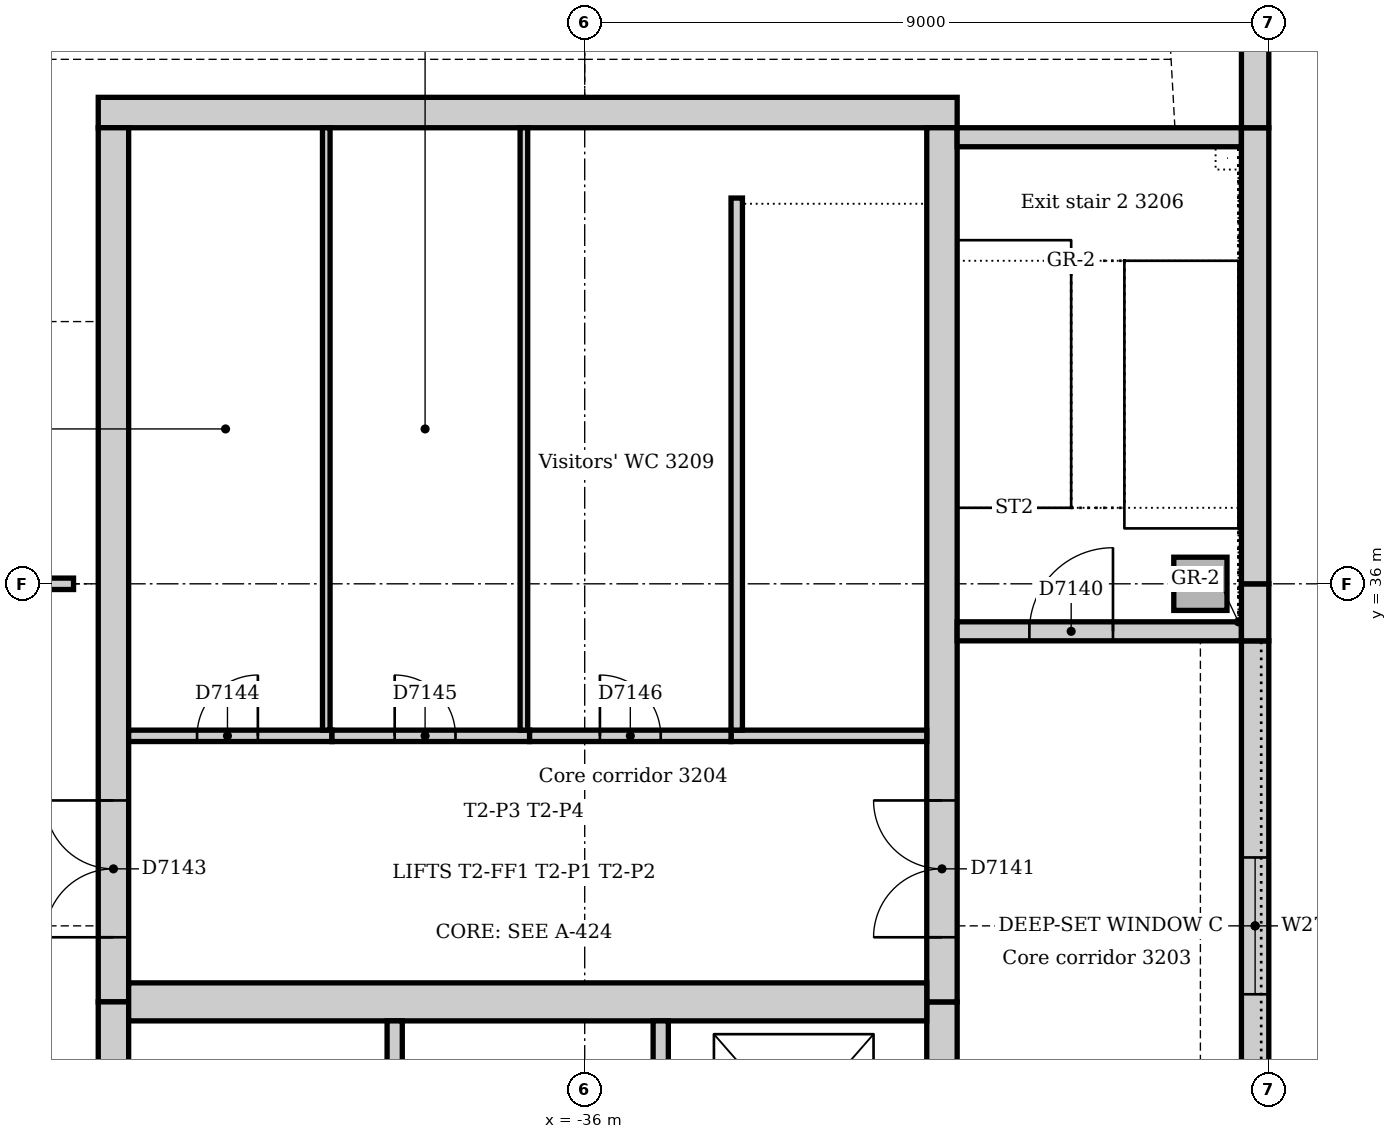
"""IFC4 building model, lengths in metres.
Left out: names, types, materials, properties, quantities, classifications, styles, units other than length and angle.
Written with IfcOpenShell. Run it as: python <this file> out.ifc"""

import sys

from ifc_helpers import new_model, si_unit, direction, frame, frame_2d, origin, origin_2d, place, context, subcontext, project, spatial, rectangle, extrude, element, fill, save


model = new_model("IFC4")
c1 = context("Model", 3, precision=1e-05, world=origin(), true_north=direction((0.0, 1.0)))
c2 = subcontext(c1, "Body", "Model", "MODEL_VIEW")
j1 = project(units=[si_unit("LENGTHUNIT", "METRE"), si_unit("PLANEANGLEUNIT", "RADIAN")], contexts=[c1])
p1 = place(None, origin())
s1 = spatial("IfcSite", under=j1, at=p1, CompositionType="ELEMENT")
p2 = place(p1, origin())
s2 = spatial("IfcBuilding", under=s1, at=p2, CompositionType="ELEMENT")
p3 = place(p2, frame((0.0, 0.0, 136.0)))
s3 = spatial("IfcBuildingStorey", under=s2, at=p3, CompositionType="ELEMENT", Elevation=136.0)
p4 = place(p3, frame((-31.1, 42.2, 0.0), z_axis=(0.0, 0.0, 1.0), x_axis=(-1.0, 0.0, 0.0)))
e1 = element("IfcWall", 1, at=p4, inside=s3, PredefinedType="SOLIDWALL", context=c2, shape_type="SweptSolid", body=[
    extrude(rectangle(XDim=11.3, YDim=0.4, at=frame_2d((5.65, 0.0))), origin(), (0.0, 0.0, 1.0), 4.0),
])
p5 = place(p3, frame((-31.3, 21.0, 0.0), z_axis=(0.0, 0.0, 1.0), x_axis=(0.0, 1.0, 0.0)))
e2 = element("IfcWall", 2, at=p5, inside=s3, PredefinedType="SOLIDWALL", context=c2, shape_type="SweptSolid", body=[
    extrude(rectangle(XDim=9.5, YDim=0.4, at=frame_2d((4.75, 0.0))), origin(), (0.0, 0.0, 1.0), 4.0),
])
p6 = place(p5, frame((5.25, 0.0, 0.0)))
e3 = element("IfcOpeningElement", 3, at=p6, cuts=e2, PredefinedType="OPENING", context=c2, shape_type="SweptSolid", body=[
    extrude(rectangle(XDim=1.0, YDim=2.1, at=frame_2d((0.5, 1.05))), frame((0.0, 0.21, 0.0), z_axis=(0.0, -1.0, 0.0), x_axis=(1.0, 0.0, 0.0)), (0.0, 0.0, 1.0), 0.42),
])
p7 = place(p3, frame((-31.3, 30.5, 0.0), z_axis=(0.0, 0.0, 1.0), x_axis=(0.0, 1.0, 0.0)))
e4 = element("IfcWall", 4, at=p7, inside=s3, PredefinedType="SOLIDWALL", context=c2, shape_type="SweptSolid", body=[
    extrude(rectangle(XDim=11.5, YDim=0.4, at=frame_2d((5.75, 0.0))), origin(), (0.0, 0.0, 1.0), 4.0),
])
p8 = place(p7, frame((0.85, 0.0, 0.0)))
e5 = element("IfcOpeningElement", 5, at=p8, cuts=e4, PredefinedType="OPENING", context=c2, shape_type="SweptSolid", body=[
    extrude(rectangle(XDim=1.8, YDim=2.1, at=frame_2d((0.9, 1.05))), frame((0.0, 0.21, 0.0), z_axis=(0.0, -1.0, 0.0), x_axis=(1.0, 0.0, 0.0)), (0.0, 0.0, 1.0), 0.42),
])
p9 = place(p3, frame((-42.2, 42.0, 0.0), z_axis=(0.0, 0.0, 1.0), x_axis=(0.0, -1.0, 0.0)))
e6 = element("IfcWall", 6, at=p9, inside=s3, PredefinedType="SOLIDWALL", context=c2, shape_type="SweptSolid", body=[
    extrude(rectangle(XDim=11.5, YDim=0.4, at=frame_2d((5.75, 0.0))), origin(), (0.0, 0.0, 1.0), 4.0),
])
p10 = place(p9, frame((8.85, 0.0, 0.0)))
e7 = element("IfcOpeningElement", 7, at=p10, cuts=e6, PredefinedType="OPENING", context=c2, shape_type="SweptSolid", body=[
    extrude(rectangle(XDim=1.8, YDim=2.1, at=frame_2d((0.9, 1.05))), frame((0.0, 0.21, 0.0), z_axis=(0.0, -1.0, 0.0), x_axis=(1.0, 0.0, 0.0)), (0.0, 0.0, 1.0), 0.42),
])
p11 = place(p3, frame((-42.2, 30.5, 0.0), z_axis=(0.0, 0.0, 1.0), x_axis=(0.0, -1.0, 0.0)))
e8 = element("IfcWall", 8, at=p11, inside=s3, PredefinedType="SOLIDWALL", context=c2, shape_type="SweptSolid", body=[
    extrude(rectangle(XDim=9.5, YDim=0.4, at=frame_2d((4.75, 0.0))), origin(), (0.0, 0.0, 1.0), 4.0),
])
p12 = place(p11, frame((3.85, 0.0, 0.0)))
e9 = element("IfcOpeningElement", 9, at=p12, cuts=e8, PredefinedType="OPENING", context=c2, shape_type="SweptSolid", body=[
    extrude(rectangle(XDim=1.8, YDim=2.1, at=frame_2d((0.9, 1.05))), frame((0.0, 0.21, 0.0), z_axis=(0.0, -1.0, 0.0), x_axis=(1.0, 0.0, 0.0)), (0.0, 0.0, 1.0), 0.42),
])
p13 = place(p3, frame((-42.0, 30.5, 0.0), z_axis=(0.0, 0.0, 1.0), x_axis=(1.0, 0.0, 0.0)))
e10 = element("IfcWall", 10, at=p13, inside=s3, PredefinedType="SOLIDWALL", context=c2, shape_type="SweptSolid", body=[
    extrude(rectangle(XDim=10.5, YDim=0.5, at=frame_2d((5.25, 0.0))), origin(), (0.0, 0.0, 1.0), 4.0),
])
p14 = place(p3, frame((-31.1, 35.375, 0.0), z_axis=(0.0, 0.0, 1.0), x_axis=(1.0, 0.0, 0.0)))
e11 = element("IfcWall", 11, at=p14, inside=s3, PredefinedType="SOLIDWALL", context=c2, shape_type="SweptSolid", body=[
    extrude(rectangle(XDim=3.74, YDim=0.25, at=frame_2d((1.87, 0.0))), origin(), (0.0, 0.0, 1.0), 4.0),
])
p15 = place(p14, frame((0.95, 0.0, 0.0)))
e12 = element("IfcOpeningElement", 12, at=p15, cuts=e11, PredefinedType="OPENING", context=c2, shape_type="SweptSolid", body=[
    extrude(rectangle(XDim=1.1, YDim=2.1, at=frame_2d((0.55, 1.05))), frame((0.0, 0.135, 0.0), z_axis=(0.0, -1.0, 0.0), x_axis=(1.0, 0.0, 0.0)), (0.0, 0.0, 1.0), 0.27),
])
p16 = place(p3, frame((-27.36, 41.875, 0.0), z_axis=(0.0, 0.0, 1.0), x_axis=(-1.0, 0.0, 0.0)))
e13 = element("IfcWall", 13, at=p16, inside=s3, PredefinedType="SOLIDWALL", context=c2, shape_type="SweptSolid", body=[
    extrude(rectangle(XDim=3.74, YDim=0.25, at=frame_2d((1.87, 0.0))), origin(), (0.0, 0.0, 1.0), 4.0),
])
p17 = place(p3, frame((-27.9, 36.0, 0.0), z_axis=(0.0, 0.0, 1.0), x_axis=(1.0, 0.0, 0.0)))
e14 = element("IfcColumn", 14, at=p17, inside=s3, PredefinedType="COLUMN", context=c2, shape_type="SweptSolid", body=[
    extrude(rectangle(XDim=0.7, YDim=0.7, at=origin_2d()), origin(), (0.0, 0.0, 1.0), 4.0),
])
p18 = place(p3, frame((-27.18, 27.75, 0.0), z_axis=(0.0, 0.0, 1.0), x_axis=(0.0, 1.0, 0.0)))
e15 = element("IfcWall", 15, at=p18, inside=s3, PredefinedType="STANDARD", context=c2, shape_type="SweptSolid", body=[
    extrude(rectangle(XDim=7.5, YDim=0.36, at=frame_2d((3.75, 0.0))), origin(), (0.0, 0.0, 1.0), 3.436),
])
p19 = place(p18, frame((2.85, 0.0, 1.2)))
e16 = element("IfcOpeningElement", 16, at=p19, cuts=e15, PredefinedType="OPENING", context=c2, shape_type="SweptSolid", body=[
    extrude(rectangle(XDim=1.8, YDim=1.2, at=frame_2d((0.9, 0.6))), frame((0.0, 0.19, 0.0), z_axis=(0.0, -1.0, 0.0), x_axis=(1.0, 0.0, 0.0)), (0.0, 0.0, 1.0), 0.38),
])
p20 = place(p3, frame((-27.18, 35.25, 0.0), z_axis=(0.0, 0.0, 1.0), x_axis=(0.0, 1.0, 0.0)))
e17 = element("IfcWall", 17, at=p20, inside=s3, PredefinedType="STANDARD", context=c2, shape_type="SweptSolid", body=[
    extrude(rectangle(XDim=0.75, YDim=0.36, at=frame_2d((0.375, 0.0))), origin(), (0.0, 0.0, 1.0), 3.436),
])
p21 = place(p3, frame((-27.18, 36.0, 0.0), z_axis=(0.0, 0.0, 1.0), x_axis=(0.0, 1.0, 0.0)))
e18 = element("IfcWall", 18, at=p21, inside=s3, PredefinedType="STANDARD", context=c2, shape_type="SweptSolid", body=[
    extrude(rectangle(XDim=6.0, YDim=0.36, at=frame_2d((3.0, 0.0))), origin(), (0.0, 0.0, 1.0), 3.85),
])
p22 = place(p3, frame((-27.18, 42.0, 0.0), z_axis=(0.0, 0.0, 1.0), x_axis=(0.0, 1.0, 0.0)))
e19 = element("IfcWall", 19, at=p22, inside=s3, PredefinedType="STANDARD", context=c2, shape_type="SweptSolid", body=[
    extrude(rectangle(XDim=3.257, YDim=0.36, at=frame_2d((1.629, 0.0))), origin(), (0.0, 0.0, 1.0), 3.85),
])
for number, where, z_axis, x_axis in (
    (20, (-38.5, 27.4, 0.0), (0.0, 0.0, 1.0), (0.0, 1.0, 0.0)),
    (21, (-35.0, 27.4, 0.0), (0.0, 0.0, 1.0), (0.0, 1.0, 0.0)),
):
    element("IfcWall", number, at=place(p3, frame(where, z_axis=z_axis, x_axis=x_axis)), inside=s3, PredefinedType="SOLIDWALL", context=c2, shape_type="SweptSolid", body=[
        extrude(rectangle(XDim=2.85, YDim=0.2, at=frame_2d((1.425, 0.0))), origin(), (0.0, 0.0, 1.0), 4.0),
    ])
p23 = place(p3, frame((-34.075, 34.0, 0.0), z_axis=(0.0, 0.0, 1.0), x_axis=(1.0, 0.0, 0.0)))
e22 = element("IfcWall", 22, at=p23, inside=s3, PredefinedType="SOLIDWALL", context=c2, shape_type="SweptSolid", body=[
    extrude(rectangle(XDim=2.575, YDim=0.15, at=frame_2d((1.288, 0.0))), origin(), (0.0, 0.0, 1.0), 4.0),
])
p24 = place(p3, frame((-34.0, 41.075, 0.0), z_axis=(0.0, 0.0, 1.0), x_axis=(0.0, -1.0, 0.0)))
e23 = element("IfcWall", 23, at=p24, inside=s3, PredefinedType="SOLIDWALL", context=c2, shape_type="SweptSolid", body=[
    extrude(rectangle(XDim=7.0, YDim=0.15, at=frame_2d((3.5, 0.0))), origin(), (0.0, 0.0, 1.0), 4.0),
])
p25 = place(p3, frame((-39.325, 34.0, 0.0), z_axis=(0.0, 0.0, 1.0), x_axis=(-1.0, 0.0, 0.0)))
e24 = element("IfcWall", 24, at=p25, inside=s3, PredefinedType="PARTITIONING", context=c2, shape_type="SweptSolid", body=[
    extrude(rectangle(XDim=2.675, YDim=0.15, at=frame_2d((1.337, 0.0))), origin(), (0.0, 0.0, 1.0), 3.85),
])
p26 = place(p25, frame((0.975, 0.0, 0.0)))
e25 = element("IfcOpeningElement", 25, at=p26, cuts=e24, PredefinedType="OPENING", context=c2, shape_type="SweptSolid", body=[
    extrude(rectangle(XDim=0.8, YDim=2.1, at=frame_2d((0.4, 1.05))), frame((0.0, 0.085, 0.0), z_axis=(0.0, -1.0, 0.0), x_axis=(1.0, 0.0, 0.0)), (0.0, 0.0, 1.0), 0.17),
])
p27 = place(p3, frame((-36.725, 34.0, 0.0), z_axis=(0.0, 0.0, 1.0), x_axis=(-1.0, 0.0, 0.0)))
e26 = element("IfcWall", 26, at=p27, inside=s3, PredefinedType="PARTITIONING", context=c2, shape_type="SweptSolid", body=[
    extrude(rectangle(XDim=2.6, YDim=0.15, at=frame_2d((1.3, 0.0))), origin(), (0.0, 0.0, 1.0), 3.85),
])
p28 = place(p27, frame((0.975, 0.0, 0.0)))
e27 = element("IfcOpeningElement", 27, at=p28, cuts=e26, PredefinedType="OPENING", context=c2, shape_type="SweptSolid", body=[
    extrude(rectangle(XDim=0.8, YDim=2.1, at=frame_2d((0.4, 1.05))), frame((0.0, 0.085, 0.0), z_axis=(0.0, -1.0, 0.0), x_axis=(1.0, 0.0, 0.0)), (0.0, 0.0, 1.0), 0.17),
])
p29 = place(p3, frame((-34.075, 34.0, 0.0), z_axis=(0.0, 0.0, 1.0), x_axis=(-1.0, 0.0, 0.0)))
e28 = element("IfcWall", 28, at=p29, inside=s3, PredefinedType="PARTITIONING", context=c2, shape_type="SweptSolid", body=[
    extrude(rectangle(XDim=2.65, YDim=0.15, at=frame_2d((1.325, 0.0))), origin(), (0.0, 0.0, 1.0), 3.85),
])
p30 = place(p29, frame((0.925, 0.0, 0.0)))
e29 = element("IfcOpeningElement", 29, at=p30, cuts=e28, PredefinedType="OPENING", context=c2, shape_type="SweptSolid", body=[
    extrude(rectangle(XDim=0.8, YDim=2.1, at=frame_2d((0.4, 1.05))), frame((0.0, 0.085, 0.0), z_axis=(0.0, -1.0, 0.0), x_axis=(1.0, 0.0, 0.0)), (0.0, 0.0, 1.0), 0.17),
])
for number, where, z_axis, x_axis in (
    (30, (-39.4, 34.075, 0.0), (0.0, 0.0, 1.0), (0.0, 1.0, 0.0)),
    (31, (-36.8, 34.075, 0.0), (0.0, 0.0, 1.0), (0.0, 1.0, 0.0)),
):
    element("IfcWall", number, at=place(p3, frame(where, z_axis=z_axis, x_axis=x_axis)), inside=s3, PredefinedType="PARTITIONING", context=c2, shape_type="SweptSolid", body=[
        extrude(rectangle(XDim=7.925, YDim=0.1, at=frame_2d((3.962, 0.0))), origin(), (0.0, 0.0, 1.0), 3.85),
    ])
p31 = place(p3, frame((-44.7, 36.0, 0.0), z_axis=(0.0, 0.0, 1.0), x_axis=(1.0, 0.0, 0.0)))
e32 = element("IfcWall", 32, at=p31, inside=s3, PredefinedType="PARTITIONING", context=c2, shape_type="SweptSolid", body=[
    extrude(rectangle(XDim=1.975, YDim=0.15, at=frame_2d((0.988, 0.0))), origin(), (0.0, 0.0, 1.0), 3.602),
])
p32 = place(p31, frame((0.55, 0.0, 0.0)))
e33 = element("IfcOpeningElement", 33, at=p32, cuts=e32, PredefinedType="OPENING", context=c2, shape_type="SweptSolid", body=[
    extrude(rectangle(XDim=0.9, YDim=2.1, at=frame_2d((0.45, 1.05))), frame((0.0, 0.085, 0.0), z_axis=(0.0, -1.0, 0.0), x_axis=(1.0, 0.0, 0.0)), (0.0, 0.0, 1.0), 0.17),
])
p33 = place(p19, origin())
e34 = element("IfcWindow", 34, at=p33, inside=s3, PartitioningType="SINGLE_PANEL", PredefinedType="WINDOW", context=c2, shape_type="SweptSolid", body=[
    extrude(rectangle(XDim=1.8, YDim=1.2, at=frame_2d((0.9, 0.6))), frame((0.0, 0.13, 0.0), z_axis=(0.0, -1.0, 0.0), x_axis=(1.0, 0.0, 0.0)), (0.0, 0.0, 1.0), 0.06),
])
fill(e16, e34)
p34 = place(p15, origin())
e35 = element("IfcDoor", 35, at=p34, inside=s3, OperationType="SINGLE_SWING_RIGHT", PredefinedType="DOOR", context=c2, shape_type="SweptSolid", body=[
    extrude(rectangle(XDim=1.1, YDim=2.1, at=frame_2d((0.55, 1.05))), frame((0.0, 0.025, 0.0), z_axis=(0.0, -1.0, 0.0), x_axis=(1.0, 0.0, 0.0)), (0.0, 0.0, 1.0), 0.05),
])
fill(e12, e35)
p35 = place(p8, origin())
e36 = element("IfcDoor", 36, at=p35, inside=s3, OperationType="DOUBLE_DOOR_SINGLE_SWING", PredefinedType="DOOR", context=c2, shape_type="SweptSolid", body=[
    extrude(rectangle(XDim=1.8, YDim=2.1, at=frame_2d((0.9, 1.05))), frame((0.0, 0.025, 0.0), z_axis=(0.0, -1.0, 0.0), x_axis=(1.0, 0.0, 0.0)), (0.0, 0.0, 1.0), 0.05),
])
fill(e5, e36)
p36 = place(p10, frame((1.8, 0.0, 0.0), z_axis=(0.0, 0.0, 1.0), x_axis=(-1.0, 0.0, 0.0)))
e37 = element("IfcDoor", 37, at=p36, inside=s3, OperationType="DOUBLE_DOOR_SINGLE_SWING", PredefinedType="DOOR", context=c2, shape_type="SweptSolid", body=[
    extrude(rectangle(XDim=1.8, YDim=2.1, at=frame_2d((0.9, 1.05))), frame((0.0, 0.025, 0.0), z_axis=(0.0, -1.0, 0.0), x_axis=(1.0, 0.0, 0.0)), (0.0, 0.0, 1.0), 0.05),
])
fill(e7, e37)
p37 = place(p26, frame((0.8, 0.0, 0.0), z_axis=(0.0, 0.0, 1.0), x_axis=(-1.0, 0.0, 0.0)))
e38 = element("IfcDoor", 38, at=p37, inside=s3, OperationType="SINGLE_SWING_RIGHT", PredefinedType="DOOR", context=c2, shape_type="SweptSolid", body=[
    extrude(rectangle(XDim=0.8, YDim=2.1, at=frame_2d((0.4, 1.05))), frame((0.0, 0.025, 0.0), z_axis=(0.0, -1.0, 0.0), x_axis=(1.0, 0.0, 0.0)), (0.0, 0.0, 1.0), 0.05),
])
fill(e25, e38)
p38 = place(p28, frame((0.8, 0.0, 0.0), z_axis=(0.0, 0.0, 1.0), x_axis=(-1.0, 0.0, 0.0)))
e39 = element("IfcDoor", 39, at=p38, inside=s3, OperationType="SINGLE_SWING_LEFT", PredefinedType="DOOR", context=c2, shape_type="SweptSolid", body=[
    extrude(rectangle(XDim=0.8, YDim=2.1, at=frame_2d((0.4, 1.05))), frame((0.0, 0.025, 0.0), z_axis=(0.0, -1.0, 0.0), x_axis=(1.0, 0.0, 0.0)), (0.0, 0.0, 1.0), 0.05),
])
fill(e27, e39)
p39 = place(p30, frame((0.8, 0.0, 0.0), z_axis=(0.0, 0.0, 1.0), x_axis=(-1.0, 0.0, 0.0)))
e40 = element("IfcDoor", 40, at=p39, inside=s3, OperationType="SINGLE_SWING_LEFT", PredefinedType="DOOR", context=c2, shape_type="SweptSolid", body=[
    extrude(rectangle(XDim=0.8, YDim=2.1, at=frame_2d((0.4, 1.05))), frame((0.0, 0.025, 0.0), z_axis=(0.0, -1.0, 0.0), x_axis=(1.0, 0.0, 0.0)), (0.0, 0.0, 1.0), 0.05),
])
fill(e29, e40)
save(model, sys.argv[1])
